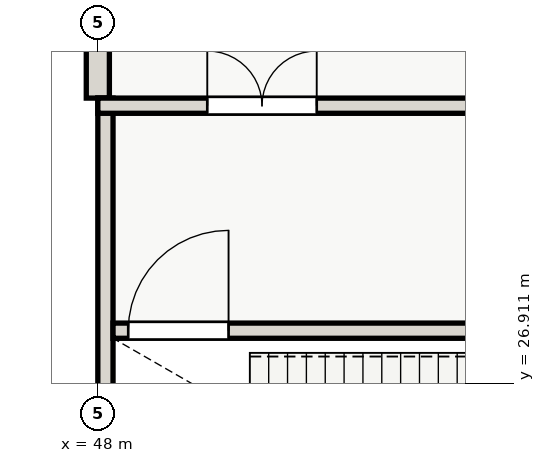
"""IFC4 building model, lengths in metres.
Left out: names, types, materials, properties, quantities, classifications, styles, units other than length and angle.
Written with IfcOpenShell. Run it as: python <this file> out.ifc"""

import sys

from ifc_helpers import new_model, si_unit, direction, frame, frame_2d, origin, place, context, subcontext, project, spatial, rectangle, extrude, element, fill, save


model = new_model("IFC4")
c1 = context("Model", 3, precision=1e-05, world=origin(), true_north=direction((0.0, 1.0)))
c2 = subcontext(c1, "Body", "Model", "MODEL_VIEW")
j1 = project(units=[si_unit("LENGTHUNIT", "METRE"), si_unit("PLANEANGLEUNIT", "RADIAN")], contexts=[c1])
p1 = place(None, origin())
s1 = spatial("IfcSite", under=j1, at=p1, CompositionType="ELEMENT")
p2 = place(p1, origin())
s2 = spatial("IfcBuilding", under=s1, at=p2, CompositionType="ELEMENT")
p3 = place(p2, frame((0.0, 0.0, 4.2)))
s3 = spatial("IfcBuildingStorey", under=s2, at=p3, CompositionType="ELEMENT", Elevation=4.2)
p4 = place(p3, frame((48.0, 31.6, 0.0), z_axis=(0.0, 0.0, 1.0), x_axis=(0.0, 1.0, 0.0)))
e1 = element("IfcWall", 1, at=p4, inside=s3, PredefinedType="SOLIDWALL", context=c2, shape_type="SweptSolid", body=[
    extrude(rectangle(XDim=4.4, YDim=0.38, at=frame_2d((2.2, 0.0))), origin(), (0.0, 0.0, 1.0), 3.35),
])
p5 = place(p3, frame((48.125, 22.4, 0.0), z_axis=(0.0, 0.0, 1.0), x_axis=(0.0, 1.0, 0.0)))
e2 = element("IfcWall", 2, at=p5, inside=s3, PredefinedType="SHEAR", context=c2, shape_type="SweptSolid", body=[
    extrude(rectangle(XDim=9.2, YDim=0.25, at=frame_2d((4.6, 0.0))), origin(), (0.0, 0.0, 1.0), 4.2),
])
p6 = place(p3, frame((48.0, 31.475, 0.0), z_axis=(0.0, 0.0, 1.0), x_axis=(1.0, 0.0, 0.0)))
e3 = element("IfcWall", 3, at=p6, inside=s3, PredefinedType="SHEAR", context=c2, shape_type="SweptSolid", body=[
    extrude(rectangle(XDim=9.2, YDim=0.25, at=frame_2d((4.6, 0.0))), origin(), (0.0, 0.0, 1.0), 4.2),
])
p7 = place(p6, frame((1.8, 0.0, 0.0)))
e4 = element("IfcOpeningElement", 4, at=p7, cuts=e3, PredefinedType="OPENING", context=c2, shape_type="SweptSolid", body=[
    extrude(rectangle(XDim=1.8, YDim=2.15, at=frame_2d((0.9, 1.075))), frame((0.0, 0.135, 0.0), z_axis=(0.0, -1.0, 0.0), x_axis=(1.0, 0.0, 0.0)), (0.0, 0.0, 1.0), 0.27),
])
p8 = place(p3, frame((48.25, 27.775, 0.0), z_axis=(0.0, 0.0, 1.0), x_axis=(1.0, 0.0, 0.0)))
e5 = element("IfcWall", 5, at=p8, inside=s3, PredefinedType="SHEAR", context=c2, shape_type="SweptSolid", body=[
    extrude(rectangle(XDim=8.7, YDim=0.25, at=frame_2d((4.35, 0.0))), origin(), (0.0, 0.0, 1.0), 4.2),
])
p9 = place(p8, frame((0.25, 0.0, 0.0)))
e6 = element("IfcOpeningElement", 6, at=p9, cuts=e5, PredefinedType="OPENING", context=c2, shape_type="SweptSolid", body=[
    extrude(rectangle(XDim=1.65, YDim=2.1, at=frame_2d((0.825, 1.05))), frame((0.0, 0.135, 0.0), z_axis=(0.0, -1.0, 0.0), x_axis=(1.0, 0.0, 0.0)), (0.0, 0.0, 1.0), 0.27),
])
p10 = place(p7, origin())
e7 = element("IfcDoor", 7, at=p10, inside=s3, OperationType="DOUBLE_DOOR_SINGLE_SWING", PredefinedType="DOOR", context=c2, shape_type="SweptSolid", body=[
    extrude(rectangle(XDim=1.8, YDim=2.15, at=frame_2d((0.9, 1.075))), frame((0.0, 0.025, 0.0), z_axis=(0.0, -1.0, 0.0), x_axis=(1.0, 0.0, 0.0)), (0.0, 0.0, 1.0), 0.05),
])
fill(e4, e7)
p11 = place(p9, origin())
e8 = element("IfcDoor", 8, at=p11, inside=s3, OperationType="SINGLE_SWING_RIGHT", PredefinedType="DOOR", context=c2, shape_type="SweptSolid", body=[
    extrude(rectangle(XDim=1.65, YDim=2.1, at=frame_2d((0.825, 1.05))), frame((0.0, 0.025, 0.0), z_axis=(0.0, -1.0, 0.0), x_axis=(1.0, 0.0, 0.0)), (0.0, 0.0, 1.0), 0.05),
])
fill(e6, e8)
save(model, sys.argv[1])
